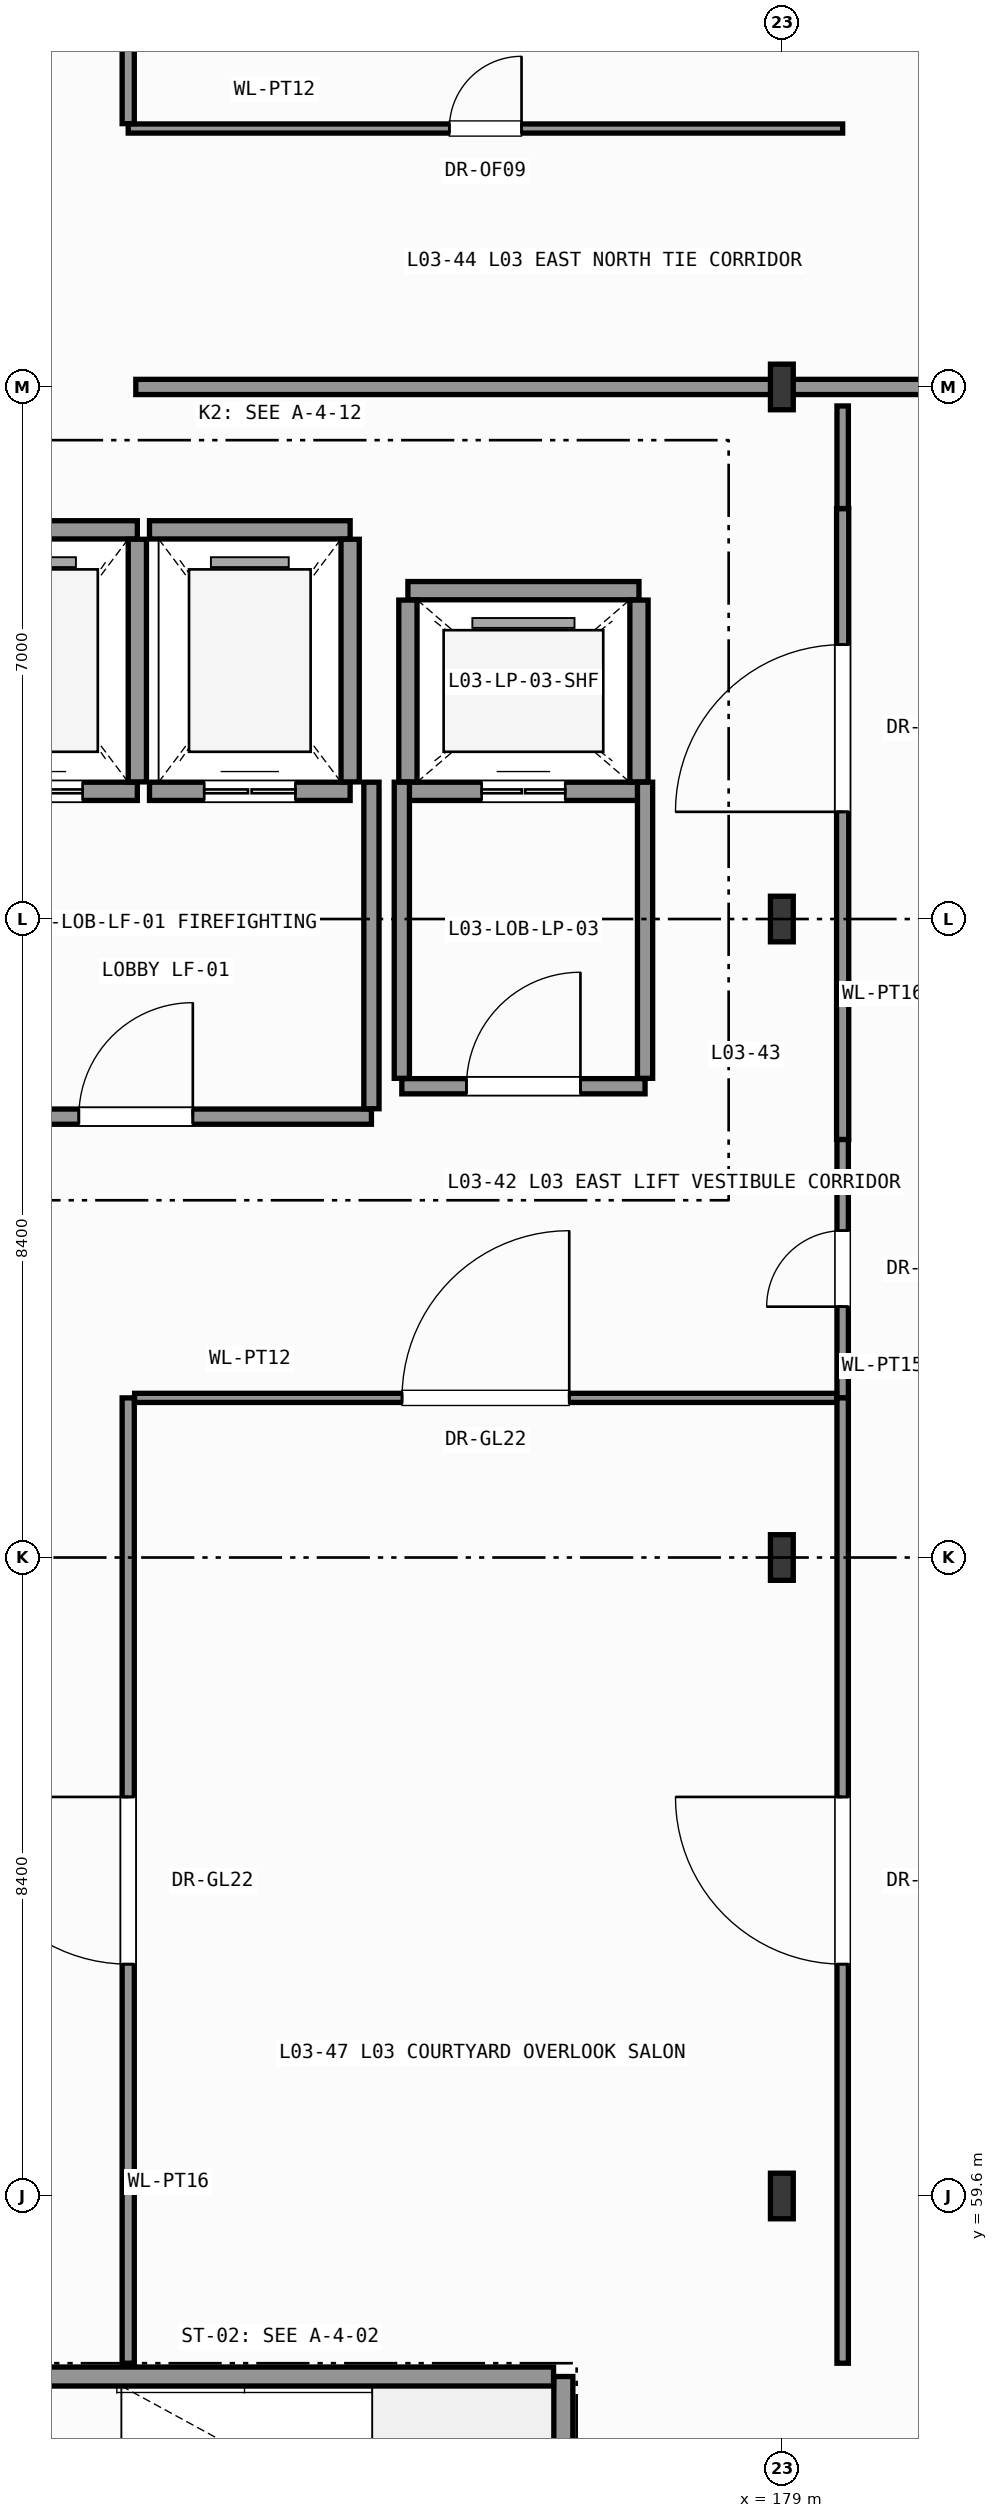
"""IFC4 building model, lengths in metres.
Left out: names, types, materials, properties, quantities, classifications, styles, units other than length and angle.
Written with IfcOpenShell. Run it as: python <this file> out.ifc"""

import sys

from ifc_helpers import new_model, si_unit, direction, frame, frame_2d, origin, origin_2d, place, context, subcontext, project, spatial, rectangle, i_section, extrude, element, fill, save


model = new_model("IFC4")
c1 = context("Model", 3, precision=1e-05, world=origin(), true_north=direction((0.0, 1.0)))
c2 = subcontext(c1, "Body", "Model", "MODEL_VIEW")
j1 = project(units=[si_unit("LENGTHUNIT", "METRE"), si_unit("PLANEANGLEUNIT", "RADIAN")], contexts=[c1])
p1 = place(None, origin())
s1 = spatial("IfcSite", under=j1, at=p1, CompositionType="ELEMENT")
p2 = place(p1, origin())
s2 = spatial("IfcBuilding", under=s1, at=p2, CompositionType="ELEMENT")
p3 = place(p2, frame((0.0, 0.0, 13.2)))
s3 = spatial("IfcBuildingStorey", under=s2, at=p3, CompositionType="ELEMENT", Elevation=13.2)
for number, where, z_axis, x_axis in (
    (1, (179.0, 59.6, 0.0), (0.0, 0.0, 1.0), (1.0, 0.0, 0.0)),
    (2, (179.0, 68.0, 0.0), (0.0, 0.0, 1.0), (1.0, 0.0, 0.0)),
    (3, (179.0, 76.4, 0.0), (0.0, 0.0, 1.0), (1.0, 0.0, 0.0)),
    (4, (179.0, 83.4, 0.0), (0.0, 0.0, 1.0), (1.0, 0.0, 0.0)),
):
    element("IfcColumn", number, at=place(p3, frame(where, z_axis=z_axis, x_axis=x_axis)), inside=s3, PredefinedType="COLUMN", context=c2, shape_type="SweptSolid", body=[
        extrude(i_section(OverallWidth=0.3, OverallDepth=0.6, WebThickness=0.015, FlangeThickness=0.03, FilletRadius=0.027, at=origin_2d()), origin(), (0.0, 0.0, 1.0), 4.8),
    ])
p4 = place(p3, frame((176.125, 53.875, 0.0), z_axis=(0.0, 0.0, 1.0), x_axis=(0.0, 1.0, 0.0)))
e5 = element("IfcWall", 5, at=p4, inside=s3, PredefinedType="SHEAR", context=c2, shape_type="SweptSolid", body=[
    extrude(rectangle(XDim=3.35, YDim=0.25, at=frame_2d((1.675, 0.0))), origin(), (0.0, 0.0, 1.0), 4.56),
])
p5 = place(p3, frame((168.804, 57.225, 0.0), z_axis=(0.0, 0.0, 1.0), x_axis=(1.0, 0.0, 0.0)))
e6 = element("IfcWall", 6, at=p5, inside=s3, PredefinedType="SHEAR", context=c2, shape_type="SweptSolid", body=[
    extrude(rectangle(XDim=7.192, YDim=0.25, at=frame_2d((3.596, 0.0))), origin(), (0.0, 0.0, 1.0), 4.56),
])
p6 = place(p3, frame((167.88, 78.08, 0.0), z_axis=(0.0, 0.0, 1.0), x_axis=(1.0, 0.0, 0.0)))
e7 = element("IfcWall", 7, at=p6, inside=s3, PredefinedType="SHEAR", context=c2, shape_type="SweptSolid", body=[
    extrude(rectangle(XDim=2.64, YDim=0.24, at=frame_2d((1.32, 0.0))), origin(), (0.0, 0.0, 1.0), 4.56),
])
p7 = place(p6, frame((0.72, 0.0, 0.0)))
e8 = element("IfcOpeningElement", 8, at=p7, cuts=e7, PredefinedType="OPENING", context=c2, shape_type="SweptSolid", body=[
    extrude(rectangle(XDim=1.2, YDim=2.2, at=frame_2d((0.6, 1.1))), frame((0.0, 0.13, 0.0), z_axis=(0.0, -1.0, 0.0), x_axis=(1.0, 0.0, 0.0)), (0.0, 0.0, 1.0), 0.26),
])
p8 = place(p3, frame((167.88, 81.52, 0.0), z_axis=(0.0, 0.0, 1.0), x_axis=(1.0, 0.0, 0.0)))
e9 = element("IfcWall", 9, at=p8, inside=s3, PredefinedType="SHEAR", context=c2, shape_type="SweptSolid", body=[
    extrude(rectangle(XDim=2.64, YDim=0.24, at=frame_2d((1.32, 0.0))), origin(), (0.0, 0.0, 1.0), 4.56),
])
p9 = place(p3, frame((170.52, 78.204, 0.0), z_axis=(0.0, 0.0, 1.0), x_axis=(0.0, 1.0, 0.0)))
e10 = element("IfcWall", 10, at=p9, inside=s3, PredefinedType="SHEAR", context=c2, shape_type="SweptSolid", body=[
    extrude(rectangle(XDim=3.192, YDim=0.24, at=frame_2d((1.596, 0.0))), origin(), (0.0, 0.0, 1.0), 4.56),
])
p10 = place(p3, frame((170.68, 78.08, 0.0), z_axis=(0.0, 0.0, 1.0), x_axis=(1.0, 0.0, 0.0)))
e11 = element("IfcWall", 11, at=p10, inside=s3, PredefinedType="SHEAR", context=c2, shape_type="SweptSolid", body=[
    extrude(rectangle(XDim=2.64, YDim=0.24, at=frame_2d((1.32, 0.0))), origin(), (0.0, 0.0, 1.0), 4.56),
])
p11 = place(p10, frame((0.72, 0.0, 0.0)))
e12 = element("IfcOpeningElement", 12, at=p11, cuts=e11, PredefinedType="OPENING", context=c2, shape_type="SweptSolid", body=[
    extrude(rectangle(XDim=1.2, YDim=2.2, at=frame_2d((0.6, 1.1))), frame((0.0, 0.13, 0.0), z_axis=(0.0, -1.0, 0.0), x_axis=(1.0, 0.0, 0.0)), (0.0, 0.0, 1.0), 0.26),
])
p12 = place(p3, frame((170.68, 81.52, 0.0), z_axis=(0.0, 0.0, 1.0), x_axis=(1.0, 0.0, 0.0)))
e13 = element("IfcWall", 13, at=p12, inside=s3, PredefinedType="SHEAR", context=c2, shape_type="SweptSolid", body=[
    extrude(rectangle(XDim=2.64, YDim=0.24, at=frame_2d((1.32, 0.0))), origin(), (0.0, 0.0, 1.0), 4.56),
])
p13 = place(p3, frame((173.32, 78.204, 0.0), z_axis=(0.0, 0.0, 1.0), x_axis=(0.0, 1.0, 0.0)))
e14 = element("IfcWall", 14, at=p13, inside=s3, PredefinedType="SHEAR", context=c2, shape_type="SweptSolid", body=[
    extrude(rectangle(XDim=3.192, YDim=0.24, at=frame_2d((1.596, 0.0))), origin(), (0.0, 0.0, 1.0), 4.56),
])
p14 = place(p3, frame((174.08, 78.08, 0.0), z_axis=(0.0, 0.0, 1.0), x_axis=(1.0, 0.0, 0.0)))
e15 = element("IfcWall", 15, at=p14, inside=s3, PredefinedType="SHEAR", context=c2, shape_type="SweptSolid", body=[
    extrude(rectangle(XDim=3.04, YDim=0.24, at=frame_2d((1.52, 0.0))), origin(), (0.0, 0.0, 1.0), 4.56),
])
p15 = place(p14, frame((0.97, 0.0, 0.0)))
e16 = element("IfcOpeningElement", 16, at=p15, cuts=e15, PredefinedType="OPENING", context=c2, shape_type="SweptSolid", body=[
    extrude(rectangle(XDim=1.1, YDim=2.2, at=frame_2d((0.55, 1.1))), frame((0.0, 0.13, 0.0), z_axis=(0.0, -1.0, 0.0), x_axis=(1.0, 0.0, 0.0)), (0.0, 0.0, 1.0), 0.26),
])
p16 = place(p3, frame((174.08, 80.72, 0.0), z_axis=(0.0, 0.0, 1.0), x_axis=(1.0, 0.0, 0.0)))
e17 = element("IfcWall", 17, at=p16, inside=s3, PredefinedType="SHEAR", context=c2, shape_type="SweptSolid", body=[
    extrude(rectangle(XDim=3.04, YDim=0.24, at=frame_2d((1.52, 0.0))), origin(), (0.0, 0.0, 1.0), 4.56),
])
for number, where, z_axis, x_axis in (
    (18, (174.08, 78.204, 0.0), (0.0, 0.0, 1.0), (0.0, 1.0, 0.0)),
    (19, (177.12, 78.204, 0.0), (0.0, 0.0, 1.0), (0.0, 1.0, 0.0)),
):
    element("IfcWall", number, at=place(p3, frame(where, z_axis=z_axis, x_axis=x_axis)), inside=s3, PredefinedType="SHEAR", context=c2, shape_type="SweptSolid", body=[
        extrude(rectangle(XDim=2.392, YDim=0.24, at=frame_2d((1.196, 0.0))), origin(), (0.0, 0.0, 1.0), 4.56),
    ])
p17 = place(p3, frame((167.4, 73.8, 0.0), z_axis=(0.0, 0.0, 1.0), x_axis=(1.0, 0.0, 0.0)))
e20 = element("IfcWall", 20, at=p17, inside=s3, PredefinedType="PARTITIONING", context=c2, shape_type="SweptSolid", body=[
    extrude(rectangle(XDim=6.2, YDim=0.2, at=frame_2d((3.1, 0.0))), origin(), (0.0, 0.0, 1.0), 4.145),
])
p18 = place(p17, frame((2.35, 0.0, 0.0)))
e21 = element("IfcOpeningElement", 21, at=p18, cuts=e20, PredefinedType="OPENING", context=c2, shape_type="SweptSolid", body=[
    extrude(rectangle(XDim=1.5, YDim=2.2, at=frame_2d((0.75, 1.1))), frame((0.0, 0.11, 0.0), z_axis=(0.0, -1.0, 0.0), x_axis=(1.0, 0.0, 0.0)), (0.0, 0.0, 1.0), 0.22),
])
p19 = place(p3, frame((173.6, 73.904, 0.0), z_axis=(0.0, 0.0, 1.0), x_axis=(0.0, 1.0, 0.0)))
e22 = element("IfcWall", 22, at=p19, inside=s3, PredefinedType="PARTITIONING", context=c2, shape_type="SweptSolid", body=[
    extrude(rectangle(XDim=4.296, YDim=0.2, at=frame_2d((2.148, 0.0))), origin(), (0.0, 0.0, 1.0), 4.56),
])
p20 = place(p3, frame((174.0, 74.2, 0.0), z_axis=(0.0, 0.0, 1.0), x_axis=(1.0, 0.0, 0.0)))
e23 = element("IfcWall", 23, at=p20, inside=s3, PredefinedType="PARTITIONING", context=c2, shape_type="SweptSolid", body=[
    extrude(rectangle(XDim=3.2, YDim=0.2, at=frame_2d((1.6, 0.0))), origin(), (0.0, 0.0, 1.0), 4.56),
])
p21 = place(p20, frame((0.85, 0.0, 0.0)))
e24 = element("IfcOpeningElement", 24, at=p21, cuts=e23, PredefinedType="OPENING", context=c2, shape_type="SweptSolid", body=[
    extrude(rectangle(XDim=1.5, YDim=2.2, at=frame_2d((0.75, 1.1))), frame((0.0, 0.11, 0.0), z_axis=(0.0, -1.0, 0.0), x_axis=(1.0, 0.0, 0.0)), (0.0, 0.0, 1.0), 0.22),
])
for number, where, z_axis, x_axis in (
    (25, (174.0, 74.304, 0.0), (0.0, 0.0, 1.0), (0.0, 1.0, 0.0)),
    (26, (177.2, 74.304, 0.0), (0.0, 0.0, 1.0), (0.0, 1.0, 0.0)),
):
    element("IfcWall", number, at=place(p3, frame(where, z_axis=z_axis, x_axis=x_axis)), inside=s3, PredefinedType="PARTITIONING", context=c2, shape_type="SweptSolid", body=[
        extrude(rectangle(XDim=3.896, YDim=0.2, at=frame_2d((1.948, 0.0))), origin(), (0.0, 0.0, 1.0), 4.56),
    ])
p22 = place(p3, frame((170.4, 57.4, 0.0), z_axis=(0.0, 0.0, 1.0), x_axis=(0.0, 1.0, 0.0)))
e27 = element("IfcWall", 27, at=p22, inside=s3, PredefinedType="PARTITIONING", context=c2, shape_type="SweptSolid", body=[
    extrude(rectangle(XDim=12.7, YDim=0.16, at=frame_2d((6.35, 0.0))), origin(), (0.0, 0.0, 1.0), 4.56),
])
p23 = place(p22, frame((5.25, 0.0, 0.0)))
e28 = element("IfcOpeningElement", 28, at=p23, cuts=e27, PredefinedType="OPENING", context=c2, shape_type="SweptSolid", body=[
    extrude(rectangle(XDim=2.2, YDim=2.6, at=frame_2d((1.1, 1.3))), frame((0.0, 0.09, 0.0), z_axis=(0.0, -1.0, 0.0), x_axis=(1.0, 0.0, 0.0)), (0.0, 0.0, 1.0), 0.18),
])
p24 = place(p3, frame((179.8, 70.1, 0.0), z_axis=(0.0, 0.0, 1.0), x_axis=(0.0, 1.0, 0.0)))
e29 = element("IfcWall", 29, at=p24, inside=s3, PredefinedType="PARTITIONING", context=c2, shape_type="SweptSolid", body=[
    extrude(rectangle(XDim=3.4, YDim=0.15, at=frame_2d((1.7, 0.0))), origin(), (0.0, 0.0, 1.0), 4.56),
])
p25 = place(p24, frame((1.2, 0.0, 0.0)))
e30 = element("IfcOpeningElement", 30, at=p25, cuts=e29, PredefinedType="OPENING", context=c2, shape_type="SweptSolid", body=[
    extrude(rectangle(XDim=1.0, YDim=2.15, at=frame_2d((0.5, 1.075))), frame((0.0, 0.085, 0.0), z_axis=(0.0, -1.0, 0.0), x_axis=(1.0, 0.0, 0.0)), (0.0, 0.0, 1.0), 0.17),
])
p26 = place(p3, frame((170.484, 70.1, 0.0), z_axis=(0.0, 0.0, 1.0), x_axis=(1.0, 0.0, 0.0)))
e31 = element("IfcWall", 31, at=p26, inside=s3, PredefinedType="PARTITIONING", context=c2, shape_type="SweptSolid", body=[
    extrude(rectangle(XDim=9.237, YDim=0.12, at=frame_2d((4.619, 0.0))), origin(), (0.0, 0.0, 1.0), 4.56),
])
p27 = place(p26, frame((3.519, 0.0, 0.0)))
e32 = element("IfcOpeningElement", 32, at=p27, cuts=e31, PredefinedType="OPENING", context=c2, shape_type="SweptSolid", body=[
    extrude(rectangle(XDim=2.2, YDim=2.6, at=frame_2d((1.1, 1.3))), frame((0.0, 0.07, 0.0), z_axis=(0.0, -1.0, 0.0), x_axis=(1.0, 0.0, 0.0)), (0.0, 0.0, 1.0), 0.14),
])
p28 = place(p3, frame((179.8, 73.5, 0.0), z_axis=(0.0, 0.0, 1.0), x_axis=(0.0, 1.0, 0.0)))
e33 = element("IfcWall", 33, at=p28, inside=s3, PredefinedType="PARTITIONING", context=c2, shape_type="SweptSolid", body=[
    extrude(rectangle(XDim=8.3, YDim=0.16, at=frame_2d((4.15, 0.0))), origin(), (0.0, 0.0, 1.0), 4.56),
])
p29 = place(p28, frame((4.31, 0.0, 0.0)))
e34 = element("IfcOpeningElement", 34, at=p29, cuts=e33, PredefinedType="OPENING", context=c2, shape_type="SweptSolid", body=[
    extrude(rectangle(XDim=2.2, YDim=2.6, at=frame_2d((1.1, 1.3))), frame((0.0, 0.09, 0.0), z_axis=(0.0, -1.0, 0.0), x_axis=(1.0, 0.0, 0.0)), (0.0, 0.0, 1.0), 0.18),
])
p30 = place(p3, frame((179.8, 81.8, 0.0), z_axis=(0.0, 0.0, 1.0), x_axis=(0.0, 1.0, 0.0)))
e35 = element("IfcWall", 35, at=p30, inside=s3, PredefinedType="PARTITIONING", context=c2, shape_type="SweptSolid", body=[
    extrude(rectangle(XDim=1.35, YDim=0.15, at=frame_2d((0.675, 0.0))), origin(), (0.0, 0.0, 1.0), 4.56),
])
p31 = place(p3, frame((170.4, 86.8, 0.0), z_axis=(0.0, 0.0, 1.0), x_axis=(1.0, 0.0, 0.0)))
e36 = element("IfcWall", 36, at=p31, inside=s3, PredefinedType="PARTITIONING", context=c2, shape_type="SweptSolid", body=[
    extrude(rectangle(XDim=9.4, YDim=0.12, at=frame_2d((4.7, 0.0))), origin(), (0.0, 0.0, 1.0), 4.205),
])
p32 = place(p31, frame((4.225, 0.0, 0.0)))
e37 = element("IfcOpeningElement", 37, at=p32, cuts=e36, PredefinedType="OPENING", context=c2, shape_type="SweptSolid", body=[
    extrude(rectangle(XDim=0.95, YDim=2.1, at=frame_2d((0.475, 1.05))), frame((0.0, 0.07, 0.0), z_axis=(0.0, -1.0, 0.0), x_axis=(1.0, 0.0, 0.0)), (0.0, 0.0, 1.0), 0.14),
])
p33 = place(p3, frame((170.4, 86.864, 0.0), z_axis=(0.0, 0.0, 1.0), x_axis=(0.0, 1.0, 0.0)))
e38 = element("IfcWall", 38, at=p33, inside=s3, PredefinedType="PARTITIONING", context=c2, shape_type="SweptSolid", body=[
    extrude(rectangle(XDim=26.086, YDim=0.16, at=frame_2d((13.043, 0.0))), origin(), (0.0, 0.0, 1.0), 4.56),
])
p34 = place(p33, frame((12.518, 0.0, 0.0)))
e39 = element("IfcOpeningElement", 39, at=p34, cuts=e38, PredefinedType="OPENING", context=c2, shape_type="SweptSolid", body=[
    extrude(rectangle(XDim=1.05, YDim=2.2, at=frame_2d((0.525, 1.1))), frame((0.0, 0.09, 0.0), z_axis=(0.0, -1.0, 0.0), x_axis=(1.0, 0.0, 0.0)), (0.0, 0.0, 1.0), 0.18),
])
p35 = place(p3, frame((179.8, 57.4, 0.0), z_axis=(0.0, 0.0, 1.0), x_axis=(0.0, 1.0, 0.0)))
e40 = element("IfcWall", 40, at=p35, inside=s3, PredefinedType="PARTITIONING", context=c2, shape_type="SweptSolid", body=[
    extrude(rectangle(XDim=12.7, YDim=0.15, at=frame_2d((6.35, 0.0))), origin(), (0.0, 0.0, 1.0), 4.56),
])
p36 = place(p35, frame((5.25, 0.0, 0.0)))
e41 = element("IfcOpeningElement", 41, at=p36, cuts=e40, PredefinedType="OPENING", context=c2, shape_type="SweptSolid", body=[
    extrude(rectangle(XDim=2.2, YDim=2.6, at=frame_2d((1.1, 1.3))), frame((0.0, 0.085, 0.0), z_axis=(0.0, -1.0, 0.0), x_axis=(1.0, 0.0, 0.0)), (0.0, 0.0, 1.0), 0.17),
])
p37 = place(p3, frame((170.5, 83.4, 0.0), z_axis=(0.0, 0.0, 1.0), x_axis=(1.0, 0.0, 0.0)))
e42 = element("IfcWall", 42, at=p37, inside=s3, PredefinedType="PARTITIONING", context=c2, shape_type="SweptSolid", body=[
    extrude(rectangle(XDim=27.3, YDim=0.2, at=frame_2d((13.65, 0.0))), origin(), (0.0, 0.0, 1.0), 3.805),
])
p38 = place(p7, origin())
e43 = element("IfcDoor", 43, at=p38, inside=s3, OperationType="DOUBLE_DOOR_SLIDING", PredefinedType="DOOR", context=c2, shape_type="SweptSolid", body=[
    extrude(rectangle(XDim=1.2, YDim=2.2, at=frame_2d((0.6, 1.1))), frame((0.0, 0.025, 0.0), z_axis=(0.0, -1.0, 0.0), x_axis=(1.0, 0.0, 0.0)), (0.0, 0.0, 1.0), 0.05),
])
fill(e8, e43)
p39 = place(p11, origin())
e44 = element("IfcDoor", 44, at=p39, inside=s3, OperationType="DOUBLE_DOOR_SLIDING", PredefinedType="DOOR", context=c2, shape_type="SweptSolid", body=[
    extrude(rectangle(XDim=1.2, YDim=2.2, at=frame_2d((0.6, 1.1))), frame((0.0, 0.025, 0.0), z_axis=(0.0, -1.0, 0.0), x_axis=(1.0, 0.0, 0.0)), (0.0, 0.0, 1.0), 0.05),
])
fill(e12, e44)
p40 = place(p15, origin())
e45 = element("IfcDoor", 45, at=p40, inside=s3, OperationType="DOUBLE_DOOR_SLIDING", PredefinedType="DOOR", context=c2, shape_type="SweptSolid", body=[
    extrude(rectangle(XDim=1.1, YDim=2.2, at=frame_2d((0.55, 1.1))), frame((0.0, 0.025, 0.0), z_axis=(0.0, -1.0, 0.0), x_axis=(1.0, 0.0, 0.0)), (0.0, 0.0, 1.0), 0.05),
])
fill(e16, e45)
p41 = place(p18, origin())
e46 = element("IfcDoor", 46, at=p41, inside=s3, OperationType="SINGLE_SWING_RIGHT", PredefinedType="DOOR", context=c2, shape_type="SweptSolid", body=[
    extrude(rectangle(XDim=1.5, YDim=2.2, at=frame_2d((0.75, 1.1))), frame((0.0, 0.025, 0.0), z_axis=(0.0, -1.0, 0.0), x_axis=(1.0, 0.0, 0.0)), (0.0, 0.0, 1.0), 0.05),
])
fill(e21, e46)
p42 = place(p21, origin())
e47 = element("IfcDoor", 47, at=p42, inside=s3, OperationType="SINGLE_SWING_RIGHT", PredefinedType="DOOR", context=c2, shape_type="SweptSolid", body=[
    extrude(rectangle(XDim=1.5, YDim=2.2, at=frame_2d((0.75, 1.1))), frame((0.0, 0.025, 0.0), z_axis=(0.0, -1.0, 0.0), x_axis=(1.0, 0.0, 0.0)), (0.0, 0.0, 1.0), 0.05),
])
fill(e24, e47)
p43 = place(p23, origin())
e48 = element("IfcDoor", 48, at=p43, inside=s3, OperationType="SINGLE_SWING_RIGHT", PredefinedType="DOOR", context=c2, shape_type="SweptSolid", body=[
    extrude(rectangle(XDim=2.2, YDim=2.6, at=frame_2d((1.1, 1.3))), frame((0.0, 0.025, 0.0), z_axis=(0.0, -1.0, 0.0), x_axis=(1.0, 0.0, 0.0)), (0.0, 0.0, 1.0), 0.05),
])
fill(e28, e48)
p44 = place(p25, origin())
e49 = element("IfcDoor", 49, at=p44, inside=s3, OperationType="SINGLE_SWING_LEFT", PredefinedType="DOOR", context=c2, shape_type="SweptSolid", body=[
    extrude(rectangle(XDim=1.0, YDim=2.15, at=frame_2d((0.5, 1.075))), frame((0.0, 0.025, 0.0), z_axis=(0.0, -1.0, 0.0), x_axis=(1.0, 0.0, 0.0)), (0.0, 0.0, 1.0), 0.05),
])
fill(e30, e49)
p45 = place(p27, origin())
e50 = element("IfcDoor", 50, at=p45, inside=s3, OperationType="SINGLE_SWING_RIGHT", PredefinedType="DOOR", context=c2, shape_type="SweptSolid", body=[
    extrude(rectangle(XDim=2.2, YDim=2.6, at=frame_2d((1.1, 1.3))), frame((0.0, 0.025, 0.0), z_axis=(0.0, -1.0, 0.0), x_axis=(1.0, 0.0, 0.0)), (0.0, 0.0, 1.0), 0.05),
])
fill(e32, e50)
p46 = place(p29, origin())
e51 = element("IfcDoor", 51, at=p46, inside=s3, OperationType="SINGLE_SWING_LEFT", PredefinedType="DOOR", context=c2, shape_type="SweptSolid", body=[
    extrude(rectangle(XDim=2.2, YDim=2.6, at=frame_2d((1.1, 1.3))), frame((0.0, 0.025, 0.0), z_axis=(0.0, -1.0, 0.0), x_axis=(1.0, 0.0, 0.0)), (0.0, 0.0, 1.0), 0.05),
])
fill(e34, e51)
p47 = place(p32, origin())
e52 = element("IfcDoor", 52, at=p47, inside=s3, OperationType="SINGLE_SWING_RIGHT", PredefinedType="DOOR", context=c2, shape_type="SweptSolid", body=[
    extrude(rectangle(XDim=0.95, YDim=2.1, at=frame_2d((0.475, 1.05))), frame((0.0, 0.025, 0.0), z_axis=(0.0, -1.0, 0.0), x_axis=(1.0, 0.0, 0.0)), (0.0, 0.0, 1.0), 0.05),
])
fill(e37, e52)
p48 = place(p36, origin())
e53 = element("IfcDoor", 53, at=p48, inside=s3, OperationType="SINGLE_SWING_RIGHT", PredefinedType="DOOR", context=c2, shape_type="SweptSolid", body=[
    extrude(rectangle(XDim=2.2, YDim=2.6, at=frame_2d((1.1, 1.3))), frame((0.0, 0.025, 0.0), z_axis=(0.0, -1.0, 0.0), x_axis=(1.0, 0.0, 0.0)), (0.0, 0.0, 1.0), 0.05),
])
fill(e41, e53)
save(model, sys.argv[1])
